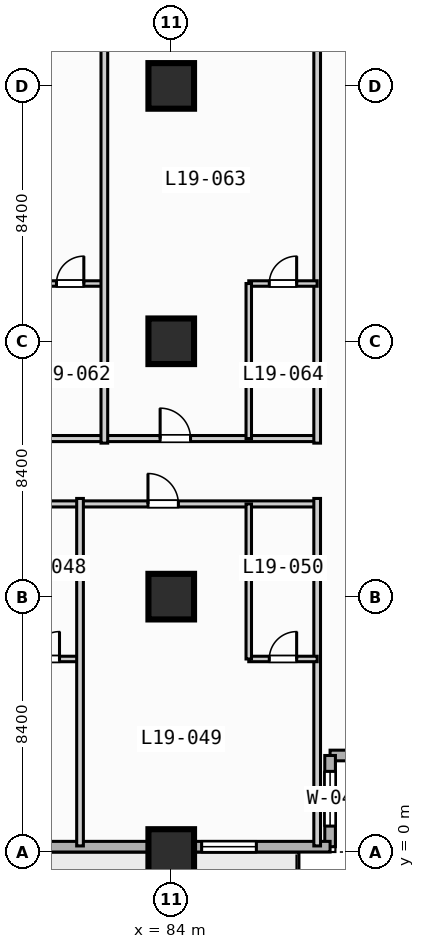
"""IFC4 building model, lengths in metres.
Left out: names, types, materials, properties, quantities, classifications, styles, units other than length and angle.
Written with IfcOpenShell. Run it as: python <this file> out.ifc"""

import sys

from ifc_helpers import new_model, si_unit, direction, frame, frame_2d, origin, origin_2d, place, context, subcontext, project, spatial, rectangle, extrude, element, fill, save


model = new_model("IFC4")
c1 = context("Model", 3, precision=1e-05, world=origin(), true_north=direction((0.0, 1.0)))
c2 = subcontext(c1, "Body", "Model", "MODEL_VIEW")
j1 = project(units=[si_unit("LENGTHUNIT", "METRE"), si_unit("PLANEANGLEUNIT", "RADIAN")], contexts=[c1])
p1 = place(None, origin())
s1 = spatial("IfcSite", under=j1, at=p1, CompositionType="ELEMENT")
p2 = place(p1, origin())
s2 = spatial("IfcBuilding", under=s1, at=p2, CompositionType="ELEMENT")
p3 = place(p2, frame((0.0, 0.0, 81.4)))
s3 = spatial("IfcBuildingStorey", under=s2, at=p3, CompositionType="ELEMENT", Elevation=81.4)
for number, where, z_axis, x_axis in (
    (1, (84.0, 0.0, 0.0), (0.0, 0.0, 1.0), (1.0, 0.0, 0.0)),
    (2, (84.0, 8.4, 0.0), (0.0, 0.0, 1.0), (1.0, 0.0, 0.0)),
    (3, (84.0, 16.8, 0.0), (0.0, 0.0, 1.0), (1.0, 0.0, 0.0)),
    (4, (84.0, 25.2, 0.0), (0.0, 0.0, 1.0), (1.0, 0.0, 0.0)),
):
    element("IfcColumn", number, at=place(p3, frame(where, z_axis=z_axis, x_axis=x_axis)), inside=s3, PredefinedType="COLUMN", context=c2, shape_type="SweptSolid", body=[
        extrude(rectangle(XDim=1.5, YDim=1.5, at=origin_2d()), origin(), (0.0, 0.0, 1.0), 3.8),
    ])
p4 = place(p3, frame((92.225, 3.175, 0.0), z_axis=(0.0, 0.0, 1.0), x_axis=(-1.0, 0.0, 0.0)))
e5 = element("IfcWall", 5, at=p4, inside=s3, PredefinedType="STANDARD", context=c2, shape_type="SweptSolid", body=[
    extrude(rectangle(XDim=3.0, YDim=0.35, at=frame_2d((1.5, 0.0))), origin(), (0.0, 0.0, 1.0), 3.55),
])
p5 = place(p3, frame((89.225, 3.175, 0.0), z_axis=(0.0, 0.0, 1.0), x_axis=(0.0, -1.0, 0.0)))
e6 = element("IfcWall", 6, at=p5, inside=s3, PredefinedType="STANDARD", context=c2, shape_type="SweptSolid", body=[
    extrude(rectangle(XDim=3.0, YDim=0.35, at=frame_2d((1.5, 0.0))), origin(), (0.0, 0.0, 1.0), 3.55),
])
p6 = place(p5, frame((0.522, 0.0, 0.85)))
e7 = element("IfcOpeningElement", 7, at=p6, cuts=e6, PredefinedType="OPENING", context=c2, shape_type="SweptSolid", body=[
    extrude(rectangle(XDim=1.8, YDim=1.8, at=frame_2d((0.9, 0.9))), frame((0.0, 0.185, 0.0), z_axis=(0.0, -1.0, 0.0), x_axis=(1.0, 0.0, 0.0)), (0.0, 0.0, 1.0), 0.37),
])
p7 = place(p3, frame((89.225, 0.175, 0.0), z_axis=(0.0, 0.0, 1.0), x_axis=(-1.0, 0.0, 0.0)))
e8 = element("IfcWall", 8, at=p7, inside=s3, PredefinedType="STANDARD", context=c2, shape_type="SweptSolid", body=[
    extrude(rectangle(XDim=86.05, YDim=0.35, at=frame_2d((43.025, 0.0))), origin(), (0.0, 0.0, 1.0), 3.55),
])
p8 = place(p7, frame((67.525, 0.0, 0.0)))
e9 = element("IfcOpeningElement", 9, at=p8, cuts=e8, PredefinedType="OPENING", context=c2, shape_type="SweptSolid", body=[
    extrude(rectangle(XDim=1.4, YDim=2.2, at=frame_2d((0.7, 1.1))), frame((0.0, 0.185, 0.0), z_axis=(0.0, -1.0, 0.0), x_axis=(1.0, 0.0, 0.0)), (0.0, 0.0, 1.0), 0.37),
])
p9 = place(p7, frame((58.725, 0.0, 0.85)))
e10 = element("IfcOpeningElement", 10, at=p9, cuts=e8, PredefinedType="OPENING", context=c2, shape_type="SweptSolid", body=[
    extrude(rectangle(XDim=2.2, YDim=1.8, at=frame_2d((1.1, 0.9))), frame((0.0, 0.185, 0.0), z_axis=(0.0, -1.0, 0.0), x_axis=(1.0, 0.0, 0.0)), (0.0, 0.0, 1.0), 0.37),
])
p10 = place(p7, frame((50.325, 0.0, 0.85)))
e11 = element("IfcOpeningElement", 11, at=p10, cuts=e8, PredefinedType="OPENING", context=c2, shape_type="SweptSolid", body=[
    extrude(rectangle(XDim=2.2, YDim=1.8, at=frame_2d((1.1, 0.9))), frame((0.0, 0.185, 0.0), z_axis=(0.0, -1.0, 0.0), x_axis=(1.0, 0.0, 0.0)), (0.0, 0.0, 1.0), 0.37),
])
p11 = place(p7, frame((41.925, 0.0, 0.85)))
e12 = element("IfcOpeningElement", 12, at=p11, cuts=e8, PredefinedType="OPENING", context=c2, shape_type="SweptSolid", body=[
    extrude(rectangle(XDim=2.2, YDim=1.8, at=frame_2d((1.1, 0.9))), frame((0.0, 0.185, 0.0), z_axis=(0.0, -1.0, 0.0), x_axis=(1.0, 0.0, 0.0)), (0.0, 0.0, 1.0), 0.37),
])
p12 = place(p7, frame((27.575, 0.0, 0.85)))
e13 = element("IfcOpeningElement", 13, at=p12, cuts=e8, PredefinedType="OPENING", context=c2, shape_type="SweptSolid", body=[
    extrude(rectangle(XDim=1.8, YDim=1.8, at=frame_2d((0.9, 0.9))), frame((0.0, 0.185, 0.0), z_axis=(0.0, -1.0, 0.0), x_axis=(1.0, 0.0, 0.0)), (0.0, 0.0, 1.0), 0.37),
])
p13 = place(p7, frame((19.175, 0.0, 0.85)))
e14 = element("IfcOpeningElement", 14, at=p13, cuts=e8, PredefinedType="OPENING", context=c2, shape_type="SweptSolid", body=[
    extrude(rectangle(XDim=1.8, YDim=1.8, at=frame_2d((0.9, 0.9))), frame((0.0, 0.185, 0.0), z_axis=(0.0, -1.0, 0.0), x_axis=(1.0, 0.0, 0.0)), (0.0, 0.0, 1.0), 0.37),
])
p14 = place(p7, frame((10.775, 0.0, 0.85)))
e15 = element("IfcOpeningElement", 15, at=p14, cuts=e8, PredefinedType="OPENING", context=c2, shape_type="SweptSolid", body=[
    extrude(rectangle(XDim=1.8, YDim=1.8, at=frame_2d((0.9, 0.9))), frame((0.0, 0.185, 0.0), z_axis=(0.0, -1.0, 0.0), x_axis=(1.0, 0.0, 0.0)), (0.0, 0.0, 1.0), 0.37),
])
p15 = place(p7, frame((2.425, 0.0, 0.85)))
e16 = element("IfcOpeningElement", 16, at=p15, cuts=e8, PredefinedType="OPENING", context=c2, shape_type="SweptSolid", body=[
    extrude(rectangle(XDim=1.8, YDim=1.8, at=frame_2d((0.9, 0.9))), frame((0.0, 0.185, 0.0), z_axis=(0.0, -1.0, 0.0), x_axis=(1.0, 0.0, 0.0)), (0.0, 0.0, 1.0), 0.37),
])
p16 = place(p3, frame((55.8, 11.45, 0.0), z_axis=(0.0, 0.0, 1.0), x_axis=(1.0, 0.0, 0.0)))
e17 = element("IfcWall", 17, at=p16, inside=s3, PredefinedType="PARTITIONING", context=c2, shape_type="SweptSolid", body=[
    extrude(rectangle(XDim=33.0, YDim=0.2, at=frame_2d((16.5, 0.0))), origin(), (0.0, 0.0, 1.0), 3.55),
])
p17 = place(p16, frame((2.535, 0.0, 0.0)))
e18 = element("IfcOpeningElement", 18, at=p17, cuts=e17, PredefinedType="OPENING", context=c2, shape_type="SweptSolid", body=[
    extrude(rectangle(XDim=1.0, YDim=2.15, at=frame_2d((0.5, 1.075))), frame((0.0, 0.11, 0.0), z_axis=(0.0, -1.0, 0.0), x_axis=(1.0, 0.0, 0.0)), (0.0, 0.0, 1.0), 0.22),
])
p18 = place(p16, frame((10.935, 0.0, 0.0)))
e19 = element("IfcOpeningElement", 19, at=p18, cuts=e17, PredefinedType="OPENING", context=c2, shape_type="SweptSolid", body=[
    extrude(rectangle(XDim=1.0, YDim=2.15, at=frame_2d((0.5, 1.075))), frame((0.0, 0.11, 0.0), z_axis=(0.0, -1.0, 0.0), x_axis=(1.0, 0.0, 0.0)), (0.0, 0.0, 1.0), 0.22),
])
p19 = place(p16, frame((19.335, 0.0, 0.0)))
e20 = element("IfcOpeningElement", 20, at=p19, cuts=e17, PredefinedType="OPENING", context=c2, shape_type="SweptSolid", body=[
    extrude(rectangle(XDim=1.0, YDim=2.15, at=frame_2d((0.5, 1.075))), frame((0.0, 0.11, 0.0), z_axis=(0.0, -1.0, 0.0), x_axis=(1.0, 0.0, 0.0)), (0.0, 0.0, 1.0), 0.22),
])
p20 = place(p16, frame((27.435, 0.0, 0.0)))
e21 = element("IfcOpeningElement", 21, at=p20, cuts=e17, PredefinedType="OPENING", context=c2, shape_type="SweptSolid", body=[
    extrude(rectangle(XDim=1.0, YDim=2.15, at=frame_2d((0.5, 1.075))), frame((0.0, 0.11, 0.0), z_axis=(0.0, -1.0, 0.0), x_axis=(1.0, 0.0, 0.0)), (0.0, 0.0, 1.0), 0.22),
])
p21 = place(p3, frame((78.75, 6.35, 0.0), z_axis=(0.0, 0.0, 1.0), x_axis=(1.0, 0.0, 0.0)))
e22 = element("IfcWall", 22, at=p21, inside=s3, PredefinedType="PLUMBINGWALL", context=c2, shape_type="SweptSolid", body=[
    extrude(rectangle(XDim=2.25, YDim=0.18, at=frame_2d((1.125, 0.0))), origin(), (0.0, 0.0, 1.0), 3.55),
])
p22 = place(p21, frame((0.675, 0.0, 0.0)))
e23 = element("IfcOpeningElement", 23, at=p22, cuts=e22, PredefinedType="OPENING", context=c2, shape_type="SweptSolid", body=[
    extrude(rectangle(XDim=0.9, YDim=2.1, at=frame_2d((0.45, 1.05))), frame((0.0, 0.1, 0.0), z_axis=(0.0, -1.0, 0.0), x_axis=(1.0, 0.0, 0.0)), (0.0, 0.0, 1.0), 0.2),
])
for number, where, z_axis, x_axis in (
    (24, (81.0, 0.2, 0.0), (0.0, 0.0, 1.0), (0.0, 1.0, 0.0)),
    (25, (88.8, 0.2, 0.0), (0.0, 0.0, 1.0), (0.0, 1.0, 0.0)),
):
    element("IfcWall", number, at=place(p3, frame(where, z_axis=z_axis, x_axis=x_axis)), inside=s3, PredefinedType="PARTITIONING", context=c2, shape_type="SweptSolid", body=[
        extrude(rectangle(XDim=11.43, YDim=0.22, at=frame_2d((5.715, 0.0))), origin(), (0.0, 0.0, 1.0), 3.55),
    ])
p23 = place(p3, frame((86.55, 6.35, 0.0), z_axis=(0.0, 0.0, 1.0), x_axis=(1.0, 0.0, 0.0)))
e26 = element("IfcWall", 26, at=p23, inside=s3, PredefinedType="PLUMBINGWALL", context=c2, shape_type="SweptSolid", body=[
    extrude(rectangle(XDim=2.25, YDim=0.18, at=frame_2d((1.125, 0.0))), origin(), (0.0, 0.0, 1.0), 3.55),
])
p24 = place(p23, frame((0.675, 0.0, 0.0)))
e27 = element("IfcOpeningElement", 27, at=p24, cuts=e26, PredefinedType="OPENING", context=c2, shape_type="SweptSolid", body=[
    extrude(rectangle(XDim=0.9, YDim=2.1, at=frame_2d((0.45, 1.05))), frame((0.0, 0.1, 0.0), z_axis=(0.0, -1.0, 0.0), x_axis=(1.0, 0.0, 0.0)), (0.0, 0.0, 1.0), 0.2),
])
p25 = place(p3, frame((86.55, 6.35, 0.0), z_axis=(0.0, 0.0, 1.0), x_axis=(0.0, 1.0, 0.0)))
e28 = element("IfcWall", 28, at=p25, inside=s3, PredefinedType="PLUMBINGWALL", context=c2, shape_type="SweptSolid", body=[
    extrude(rectangle(XDim=5.1, YDim=0.18, at=frame_2d((2.55, 0.0))), origin(), (0.0, 0.0, 1.0), 3.55),
])
p26 = place(p3, frame((61.6, 13.6, 0.0), z_axis=(0.0, 0.0, 1.0), x_axis=(1.0, 0.0, 0.0)))
e29 = element("IfcWall", 29, at=p26, inside=s3, PredefinedType="PARTITIONING", context=c2, shape_type="SweptSolid", body=[
    extrude(rectangle(XDim=27.2, YDim=0.2, at=frame_2d((13.6, 0.0))), origin(), (0.0, 0.0, 1.0), 3.55),
])
p27 = place(p26, frame((3.965, 0.0, 0.0)))
e30 = element("IfcOpeningElement", 30, at=p27, cuts=e29, PredefinedType="OPENING", context=c2, shape_type="SweptSolid", body=[
    extrude(rectangle(XDim=1.0, YDim=2.15, at=frame_2d((0.5, 1.075))), frame((0.0, 0.11, 0.0), z_axis=(0.0, -1.0, 0.0), x_axis=(1.0, 0.0, 0.0)), (0.0, 0.0, 1.0), 0.22),
])
p28 = place(p26, frame((10.565, 0.0, 0.0)))
e31 = element("IfcOpeningElement", 31, at=p28, cuts=e29, PredefinedType="OPENING", context=c2, shape_type="SweptSolid", body=[
    extrude(rectangle(XDim=1.0, YDim=2.15, at=frame_2d((0.5, 1.075))), frame((0.0, 0.11, 0.0), z_axis=(0.0, -1.0, 0.0), x_axis=(1.0, 0.0, 0.0)), (0.0, 0.0, 1.0), 0.22),
])
p29 = place(p26, frame((15.035, 0.0, 0.0)))
e32 = element("IfcOpeningElement", 32, at=p29, cuts=e29, PredefinedType="OPENING", context=c2, shape_type="SweptSolid", body=[
    extrude(rectangle(XDim=1.0, YDim=2.15, at=frame_2d((0.5, 1.075))), frame((0.0, 0.11, 0.0), z_axis=(0.0, -1.0, 0.0), x_axis=(1.0, 0.0, 0.0)), (0.0, 0.0, 1.0), 0.22),
])
p30 = place(p26, frame((22.035, 0.0, 0.0)))
e33 = element("IfcOpeningElement", 33, at=p30, cuts=e29, PredefinedType="OPENING", context=c2, shape_type="SweptSolid", body=[
    extrude(rectangle(XDim=1.0, YDim=2.15, at=frame_2d((0.5, 1.075))), frame((0.0, 0.11, 0.0), z_axis=(0.0, -1.0, 0.0), x_axis=(1.0, 0.0, 0.0)), (0.0, 0.0, 1.0), 0.22),
])
p31 = place(p3, frame((79.55, 18.7, 0.0), z_axis=(0.0, 0.0, 1.0), x_axis=(1.0, 0.0, 0.0)))
e34 = element("IfcWall", 34, at=p31, inside=s3, PredefinedType="PLUMBINGWALL", context=c2, shape_type="SweptSolid", body=[
    extrude(rectangle(XDim=2.25, YDim=0.18, at=frame_2d((1.125, 0.0))), origin(), (0.0, 0.0, 1.0), 3.55),
])
p32 = place(p31, frame((0.675, 0.0, 0.0)))
e35 = element("IfcOpeningElement", 35, at=p32, cuts=e34, PredefinedType="OPENING", context=c2, shape_type="SweptSolid", body=[
    extrude(rectangle(XDim=0.9, YDim=2.1, at=frame_2d((0.45, 1.05))), frame((0.0, 0.1, 0.0), z_axis=(0.0, -1.0, 0.0), x_axis=(1.0, 0.0, 0.0)), (0.0, 0.0, 1.0), 0.2),
])
for number, where, z_axis, x_axis in (
    (36, (81.8, 13.45, 0.0), (0.0, 0.0, 1.0), (0.0, 1.0, 0.0)),
    (37, (88.8, 13.45, 0.0), (0.0, 0.0, 1.0), (0.0, 1.0, 0.0)),
):
    element("IfcWall", number, at=place(p3, frame(where, z_axis=z_axis, x_axis=x_axis)), inside=s3, PredefinedType="PARTITIONING", context=c2, shape_type="SweptSolid", body=[
        extrude(rectangle(XDim=19.98, YDim=0.22, at=frame_2d((9.99, 0.0))), origin(), (0.0, 0.0, 1.0), 3.55),
    ])
p33 = place(p3, frame((86.55, 18.7, 0.0), z_axis=(0.0, 0.0, 1.0), x_axis=(1.0, 0.0, 0.0)))
e38 = element("IfcWall", 38, at=p33, inside=s3, PredefinedType="PLUMBINGWALL", context=c2, shape_type="SweptSolid", body=[
    extrude(rectangle(XDim=2.25, YDim=0.18, at=frame_2d((1.125, 0.0))), origin(), (0.0, 0.0, 1.0), 3.55),
])
p34 = place(p33, frame((0.675, 0.0, 0.0)))
e39 = element("IfcOpeningElement", 39, at=p34, cuts=e38, PredefinedType="OPENING", context=c2, shape_type="SweptSolid", body=[
    extrude(rectangle(XDim=0.9, YDim=2.1, at=frame_2d((0.45, 1.05))), frame((0.0, 0.1, 0.0), z_axis=(0.0, -1.0, 0.0), x_axis=(1.0, 0.0, 0.0)), (0.0, 0.0, 1.0), 0.2),
])
p35 = place(p3, frame((86.55, 13.6, 0.0), z_axis=(0.0, 0.0, 1.0), x_axis=(0.0, 1.0, 0.0)))
e40 = element("IfcWall", 40, at=p35, inside=s3, PredefinedType="PLUMBINGWALL", context=c2, shape_type="SweptSolid", body=[
    extrude(rectangle(XDim=5.1, YDim=0.18, at=frame_2d((2.55, 0.0))), origin(), (0.0, 0.0, 1.0), 3.55),
])
p36 = place(p6, origin())
e41 = element("IfcWindow", 41, at=p36, inside=s3, PartitioningType="SINGLE_PANEL", PredefinedType="WINDOW", context=c2, shape_type="SweptSolid", body=[
    extrude(rectangle(XDim=1.8, YDim=1.8, at=frame_2d((0.9, 0.9))), frame((0.0, 0.03, 0.0), z_axis=(0.0, -1.0, 0.0), x_axis=(1.0, 0.0, 0.0)), (0.0, 0.0, 1.0), 0.06),
])
fill(e7, e41)
p37 = place(p15, origin())
e42 = element("IfcWindow", 42, at=p37, inside=s3, PartitioningType="SINGLE_PANEL", PredefinedType="WINDOW", context=c2, shape_type="SweptSolid", body=[
    extrude(rectangle(XDim=1.8, YDim=1.8, at=frame_2d((0.9, 0.9))), frame((0.0, 0.03, 0.0), z_axis=(0.0, -1.0, 0.0), x_axis=(1.0, 0.0, 0.0)), (0.0, 0.0, 1.0), 0.06),
])
fill(e16, e42)
p38 = place(p20, origin())
e43 = element("IfcDoor", 43, at=p38, inside=s3, OperationType="SINGLE_SWING_LEFT", PredefinedType="DOOR", context=c2, shape_type="SweptSolid", body=[
    extrude(rectangle(XDim=1.0, YDim=2.15, at=frame_2d((0.5, 1.075))), frame((0.0, 0.025, 0.0), z_axis=(0.0, -1.0, 0.0), x_axis=(1.0, 0.0, 0.0)), (0.0, 0.0, 1.0), 0.05),
])
fill(e21, e43)
p39 = place(p22, origin())
e44 = element("IfcDoor", 44, at=p39, inside=s3, OperationType="SINGLE_SWING_RIGHT", PredefinedType="DOOR", context=c2, shape_type="SweptSolid", body=[
    extrude(rectangle(XDim=0.9, YDim=2.1, at=frame_2d((0.45, 1.05))), frame((0.0, 0.025, 0.0), z_axis=(0.0, -1.0, 0.0), x_axis=(1.0, 0.0, 0.0)), (0.0, 0.0, 1.0), 0.05),
])
fill(e23, e44)
p40 = place(p24, origin())
e45 = element("IfcDoor", 45, at=p40, inside=s3, OperationType="SINGLE_SWING_RIGHT", PredefinedType="DOOR", context=c2, shape_type="SweptSolid", body=[
    extrude(rectangle(XDim=0.9, YDim=2.1, at=frame_2d((0.45, 1.05))), frame((0.0, 0.025, 0.0), z_axis=(0.0, -1.0, 0.0), x_axis=(1.0, 0.0, 0.0)), (0.0, 0.0, 1.0), 0.05),
])
fill(e27, e45)
p41 = place(p30, origin())
e46 = element("IfcDoor", 46, at=p41, inside=s3, OperationType="SINGLE_SWING_LEFT", PredefinedType="DOOR", context=c2, shape_type="SweptSolid", body=[
    extrude(rectangle(XDim=1.0, YDim=2.15, at=frame_2d((0.5, 1.075))), frame((0.0, 0.025, 0.0), z_axis=(0.0, -1.0, 0.0), x_axis=(1.0, 0.0, 0.0)), (0.0, 0.0, 1.0), 0.05),
])
fill(e33, e46)
p42 = place(p32, origin())
e47 = element("IfcDoor", 47, at=p42, inside=s3, OperationType="SINGLE_SWING_RIGHT", PredefinedType="DOOR", context=c2, shape_type="SweptSolid", body=[
    extrude(rectangle(XDim=0.9, YDim=2.1, at=frame_2d((0.45, 1.05))), frame((0.0, 0.025, 0.0), z_axis=(0.0, -1.0, 0.0), x_axis=(1.0, 0.0, 0.0)), (0.0, 0.0, 1.0), 0.05),
])
fill(e35, e47)
p43 = place(p34, origin())
e48 = element("IfcDoor", 48, at=p43, inside=s3, OperationType="SINGLE_SWING_RIGHT", PredefinedType="DOOR", context=c2, shape_type="SweptSolid", body=[
    extrude(rectangle(XDim=0.9, YDim=2.1, at=frame_2d((0.45, 1.05))), frame((0.0, 0.025, 0.0), z_axis=(0.0, -1.0, 0.0), x_axis=(1.0, 0.0, 0.0)), (0.0, 0.0, 1.0), 0.05),
])
fill(e39, e48)
save(model, sys.argv[1])
